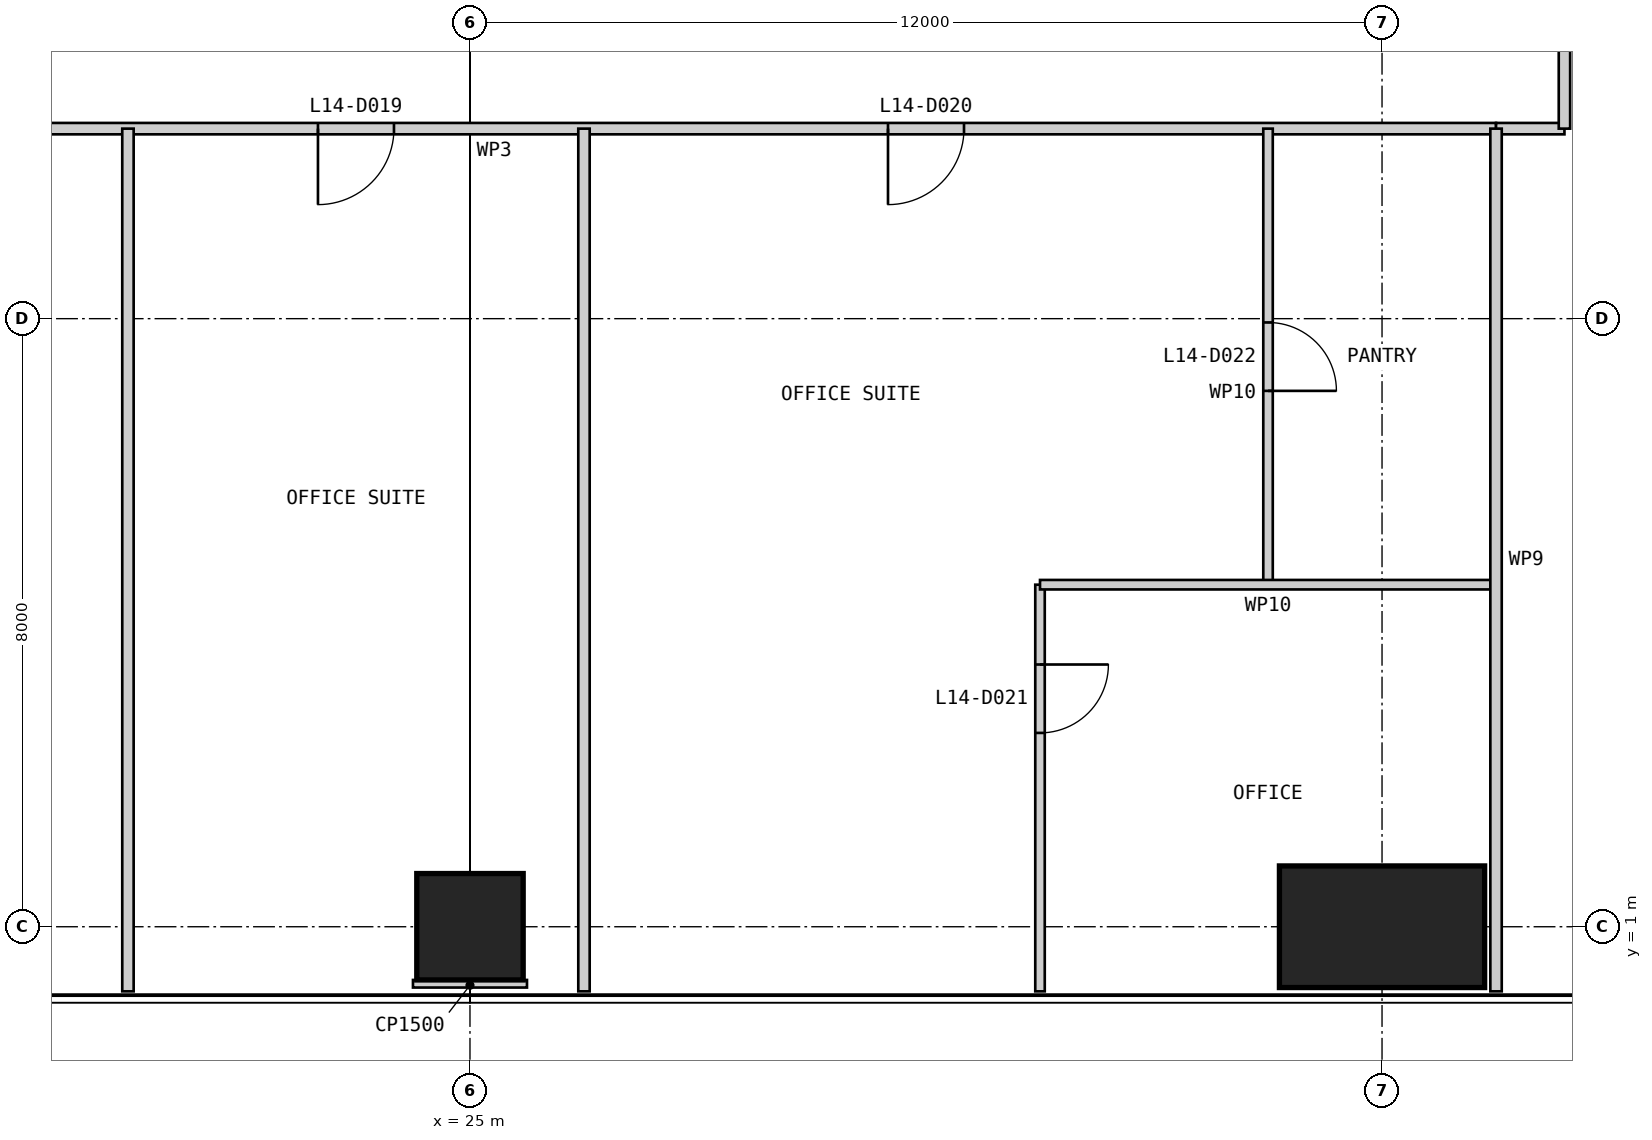
"""IFC4 building model, lengths in metres.
Left out: names, types, materials, properties, quantities, classifications, styles, units other than length and angle.
Written with IfcOpenShell. Run it as: python <this file> out.ifc"""

import sys

from ifc_helpers import new_model, si_unit, direction, frame, frame_2d, origin, origin_2d, place, context, subcontext, project, spatial, rectangle, extrude, element, fill, save


model = new_model("IFC4")
c1 = context("Model", 3, precision=1e-05, world=origin(), true_north=direction((0.0, 1.0)))
c2 = subcontext(c1, "Body", "Model", "MODEL_VIEW")
j1 = project(units=[si_unit("LENGTHUNIT", "METRE"), si_unit("PLANEANGLEUNIT", "RADIAN")], contexts=[c1])
p1 = place(None, origin())
s1 = spatial("IfcSite", under=j1, at=p1, CompositionType="ELEMENT")
p2 = place(p1, origin())
s2 = spatial("IfcBuilding", under=s1, at=p2, CompositionType="ELEMENT")
p3 = place(p2, frame((0.0, 0.0, 63.0)))
s3 = spatial("IfcBuildingStorey", under=s2, at=p3, CompositionType="ELEMENT", Elevation=63.0)
p4 = place(p3, frame((25.0, 1.0, 0.0), z_axis=(0.0, 0.0, 1.0), x_axis=(1.0, 0.0, 0.0)))
e1 = element("IfcColumn", 1, at=p4, inside=s3, PredefinedType="COLUMN", context=c2, shape_type="SweptSolid", body=[
    extrude(rectangle(XDim=1.4, YDim=1.4, at=origin_2d()), origin(), (0.0, 0.0, 1.0), 4.0),
])
p5 = place(p3, frame((37.0, 1.0, 0.0), z_axis=(0.0, 0.0, 1.0), x_axis=(1.0, 0.0, 0.0)))
e2 = element("IfcColumn", 2, at=p5, inside=s3, PredefinedType="COLUMN", context=c2, shape_type="SweptSolid", body=[
    extrude(rectangle(XDim=2.7, YDim=1.6, at=origin_2d()), origin(), (0.0, 0.0, 1.0), 4.0),
])
p6 = place(p3, frame((11.5, 11.5, 0.0), z_axis=(0.0, 0.0, 1.0), x_axis=(1.0, 0.0, 0.0)))
e3 = element("IfcWall", 3, at=p6, inside=s3, PredefinedType="PARTITIONING", context=c2, shape_type="SweptSolid", body=[
    extrude(rectangle(XDim=27.0, YDim=0.15, at=frame_2d((13.5, 0.0))), origin(), (0.0, 0.0, 1.0), 3.85),
])
p7 = place(p6, frame((1.0, 0.0, 0.0)))
e4 = element("IfcOpeningElement", 4, at=p7, cuts=e3, PredefinedType="OPENING", context=c2, shape_type="SweptSolid", body=[
    extrude(rectangle(XDim=1.0, YDim=2.2, at=frame_2d((0.5, 1.1))), frame((0.0, 0.085, 0.0), z_axis=(0.0, -1.0, 0.0), x_axis=(1.0, 0.0, 0.0)), (0.0, 0.0, 1.0), 0.17),
])
p8 = place(p6, frame((5.5, 0.0, 0.0)))
e5 = element("IfcOpeningElement", 5, at=p8, cuts=e3, PredefinedType="OPENING", context=c2, shape_type="SweptSolid", body=[
    extrude(rectangle(XDim=1.0, YDim=2.2, at=frame_2d((0.5, 1.1))), frame((0.0, 0.085, 0.0), z_axis=(0.0, -1.0, 0.0), x_axis=(1.0, 0.0, 0.0)), (0.0, 0.0, 1.0), 0.17),
])
p9 = place(p6, frame((11.5, 0.0, 0.0)))
e6 = element("IfcOpeningElement", 6, at=p9, cuts=e3, PredefinedType="OPENING", context=c2, shape_type="SweptSolid", body=[
    extrude(rectangle(XDim=1.0, YDim=2.2, at=frame_2d((0.5, 1.1))), frame((0.0, 0.085, 0.0), z_axis=(0.0, -1.0, 0.0), x_axis=(1.0, 0.0, 0.0)), (0.0, 0.0, 1.0), 0.17),
])
p10 = place(p6, frame((19.0, 0.0, 0.0)))
e7 = element("IfcOpeningElement", 7, at=p10, cuts=e3, PredefinedType="OPENING", context=c2, shape_type="SweptSolid", body=[
    extrude(rectangle(XDim=1.0, YDim=2.2, at=frame_2d((0.5, 1.1))), frame((0.0, 0.085, 0.0), z_axis=(0.0, -1.0, 0.0), x_axis=(1.0, 0.0, 0.0)), (0.0, 0.0, 1.0), 0.17),
])
for number, where, z_axis, x_axis in (
    (8, (20.5, 0.15, 0.0), (0.0, 0.0, 1.0), (0.0, 1.0, 0.0)),
    (9, (26.5, 0.15, 0.0), (0.0, 0.0, 1.0), (0.0, 1.0, 0.0)),
):
    element("IfcWall", number, at=place(p3, frame(where, z_axis=z_axis, x_axis=x_axis)), inside=s3, PredefinedType="PARTITIONING", context=c2, shape_type="SweptSolid", body=[
        extrude(rectangle(XDim=11.35, YDim=0.15, at=frame_2d((5.675, 0.0))), origin(), (0.0, 0.0, 1.0), 3.85),
    ])
p11 = place(p3, frame((32.5, 0.15, 0.0), z_axis=(0.0, 0.0, 1.0), x_axis=(0.0, 1.0, 0.0)))
e10 = element("IfcWall", 10, at=p11, inside=s3, PredefinedType="PARTITIONING", context=c2, shape_type="SweptSolid", body=[
    extrude(rectangle(XDim=5.35, YDim=0.125, at=frame_2d((2.675, 0.0))), origin(), (0.0, 0.0, 1.0), 3.85),
])
p12 = place(p11, frame((3.4, 0.0, 0.0)))
e11 = element("IfcOpeningElement", 11, at=p12, cuts=e10, PredefinedType="OPENING", context=c2, shape_type="SweptSolid", body=[
    extrude(rectangle(XDim=0.9, YDim=2.2, at=frame_2d((0.45, 1.1))), frame((0.0, 0.073, 0.0), z_axis=(0.0, -1.0, 0.0), x_axis=(1.0, 0.0, 0.0)), (0.0, 0.0, 1.0), 0.145),
])
p13 = place(p3, frame((35.5, 5.5, 0.0), z_axis=(0.0, 0.0, 1.0), x_axis=(0.0, 1.0, 0.0)))
e12 = element("IfcWall", 12, at=p13, inside=s3, PredefinedType="PARTITIONING", context=c2, shape_type="SweptSolid", body=[
    extrude(rectangle(XDim=6.0, YDim=0.125, at=frame_2d((3.0, 0.0))), origin(), (0.0, 0.0, 1.0), 3.85),
])
p14 = place(p13, frame((2.55, 0.0, 0.0)))
e13 = element("IfcOpeningElement", 13, at=p14, cuts=e12, PredefinedType="OPENING", context=c2, shape_type="SweptSolid", body=[
    extrude(rectangle(XDim=0.9, YDim=2.2, at=frame_2d((0.45, 1.1))), frame((0.0, 0.073, 0.0), z_axis=(0.0, -1.0, 0.0), x_axis=(1.0, 0.0, 0.0)), (0.0, 0.0, 1.0), 0.145),
])
p15 = place(p3, frame((32.5, 5.5, 0.0), z_axis=(0.0, 0.0, 1.0), x_axis=(1.0, 0.0, 0.0)))
e14 = element("IfcWall", 14, at=p15, inside=s3, PredefinedType="PARTITIONING", context=c2, shape_type="SweptSolid", body=[
    extrude(rectangle(XDim=6.0, YDim=0.125, at=frame_2d((3.0, 0.0))), origin(), (0.0, 0.0, 1.0), 3.85),
])
p16 = place(p3, frame((38.5, 11.5, 0.0), z_axis=(0.0, 0.0, 1.0), x_axis=(1.0, 0.0, 0.0)))
e15 = element("IfcWall", 15, at=p16, inside=s3, PredefinedType="PARTITIONING", context=c2, shape_type="SweptSolid", body=[
    extrude(rectangle(XDim=0.9, YDim=0.15, at=frame_2d((0.45, 0.0))), origin(), (0.0, 0.0, 1.0), 3.85),
])
p17 = place(p3, frame((39.4, 11.5, 0.0), z_axis=(0.0, 0.0, 1.0), x_axis=(0.0, 1.0, 0.0)))
e16 = element("IfcWall", 16, at=p17, inside=s3, PredefinedType="PARTITIONING", context=c2, shape_type="SweptSolid", body=[
    extrude(rectangle(XDim=27.9, YDim=0.15, at=frame_2d((13.95, 0.0))), origin(), (0.0, 0.0, 1.0), 3.85),
])
p18 = place(p17, frame((2.5, 0.0, 0.0)))
e17 = element("IfcOpeningElement", 17, at=p18, cuts=e16, PredefinedType="OPENING", context=c2, shape_type="SweptSolid", body=[
    extrude(rectangle(XDim=1.0, YDim=2.2, at=frame_2d((0.5, 1.1))), frame((0.0, 0.085, 0.0), z_axis=(0.0, -1.0, 0.0), x_axis=(1.0, 0.0, 0.0)), (0.0, 0.0, 1.0), 0.17),
])
p19 = place(p17, frame((9.25, 0.0, 0.0)))
e18 = element("IfcOpeningElement", 18, at=p19, cuts=e16, PredefinedType="OPENING", context=c2, shape_type="SweptSolid", body=[
    extrude(rectangle(XDim=1.0, YDim=2.2, at=frame_2d((0.5, 1.1))), frame((0.0, 0.085, 0.0), z_axis=(0.0, -1.0, 0.0), x_axis=(1.0, 0.0, 0.0)), (0.0, 0.0, 1.0), 0.17),
])
p20 = place(p17, frame((16.75, 0.0, 0.0)))
e19 = element("IfcOpeningElement", 19, at=p20, cuts=e16, PredefinedType="OPENING", context=c2, shape_type="SweptSolid", body=[
    extrude(rectangle(XDim=1.0, YDim=2.2, at=frame_2d((0.5, 1.1))), frame((0.0, 0.085, 0.0), z_axis=(0.0, -1.0, 0.0), x_axis=(1.0, 0.0, 0.0)), (0.0, 0.0, 1.0), 0.17),
])
p21 = place(p17, frame((23.5, 0.0, 0.0)))
e20 = element("IfcOpeningElement", 20, at=p21, cuts=e16, PredefinedType="OPENING", context=c2, shape_type="SweptSolid", body=[
    extrude(rectangle(XDim=1.0, YDim=2.2, at=frame_2d((0.5, 1.1))), frame((0.0, 0.085, 0.0), z_axis=(0.0, -1.0, 0.0), x_axis=(1.0, 0.0, 0.0)), (0.0, 0.0, 1.0), 0.17),
])
p22 = place(p3, frame((38.5, 0.15, 0.0), z_axis=(0.0, 0.0, 1.0), x_axis=(0.0, 1.0, 0.0)))
e21 = element("IfcWall", 21, at=p22, inside=s3, PredefinedType="PARTITIONING", context=c2, shape_type="SweptSolid", body=[
    extrude(rectangle(XDim=11.35, YDim=0.15, at=frame_2d((5.675, 0.0))), origin(), (0.0, 0.0, 1.0), 3.85),
])
p23 = place(p3, frame((25.0, 0.2, 0.0), z_axis=(0.0, 0.0, 1.0), x_axis=(0.0, 1.0, 0.0)))
e22 = element("IfcWall", 22, at=p23, inside=s3, PredefinedType="PARTITIONING", context=c2, shape_type="SweptSolid", body=[
    extrude(rectangle(XDim=0.1, YDim=1.5, at=frame_2d((0.05, 0.0))), origin(), (0.0, 0.0, 1.0), 3.85),
])
p24 = place(p9, frame((1.0, 0.0, 0.0), z_axis=(0.0, 0.0, 1.0), x_axis=(-1.0, 0.0, 0.0)))
e23 = element("IfcDoor", 23, at=p24, inside=s3, OperationType="SINGLE_SWING_RIGHT", PredefinedType="DOOR", context=c2, shape_type="SweptSolid", body=[
    extrude(rectangle(XDim=1.0, YDim=2.2, at=frame_2d((0.5, 1.1))), frame((0.0, 0.025, 0.0), z_axis=(0.0, -1.0, 0.0), x_axis=(1.0, 0.0, 0.0)), (0.0, 0.0, 1.0), 0.05),
])
fill(e6, e23)
p25 = place(p10, frame((1.0, 0.0, 0.0), z_axis=(0.0, 0.0, 1.0), x_axis=(-1.0, 0.0, 0.0)))
e24 = element("IfcDoor", 24, at=p25, inside=s3, OperationType="SINGLE_SWING_RIGHT", PredefinedType="DOOR", context=c2, shape_type="SweptSolid", body=[
    extrude(rectangle(XDim=1.0, YDim=2.2, at=frame_2d((0.5, 1.1))), frame((0.0, 0.025, 0.0), z_axis=(0.0, -1.0, 0.0), x_axis=(1.0, 0.0, 0.0)), (0.0, 0.0, 1.0), 0.05),
])
fill(e7, e24)
p26 = place(p12, frame((0.9, 0.0, 0.0), z_axis=(0.0, 0.0, 1.0), x_axis=(-1.0, 0.0, 0.0)))
e25 = element("IfcDoor", 25, at=p26, inside=s3, OperationType="SINGLE_SWING_LEFT", PredefinedType="DOOR", context=c2, shape_type="SweptSolid", body=[
    extrude(rectangle(XDim=0.9, YDim=2.2, at=frame_2d((0.45, 1.1))), frame((0.0, 0.025, 0.0), z_axis=(0.0, -1.0, 0.0), x_axis=(1.0, 0.0, 0.0)), (0.0, 0.0, 1.0), 0.05),
])
fill(e11, e25)
p27 = place(p14, frame((0.9, 0.0, 0.0), z_axis=(0.0, 0.0, 1.0), x_axis=(-1.0, 0.0, 0.0)))
e26 = element("IfcDoor", 26, at=p27, inside=s3, OperationType="SINGLE_SWING_RIGHT", PredefinedType="DOOR", context=c2, shape_type="SweptSolid", body=[
    extrude(rectangle(XDim=0.9, YDim=2.2, at=frame_2d((0.45, 1.1))), frame((0.0, 0.025, 0.0), z_axis=(0.0, -1.0, 0.0), x_axis=(1.0, 0.0, 0.0)), (0.0, 0.0, 1.0), 0.05),
])
fill(e13, e26)
save(model, sys.argv[1])
